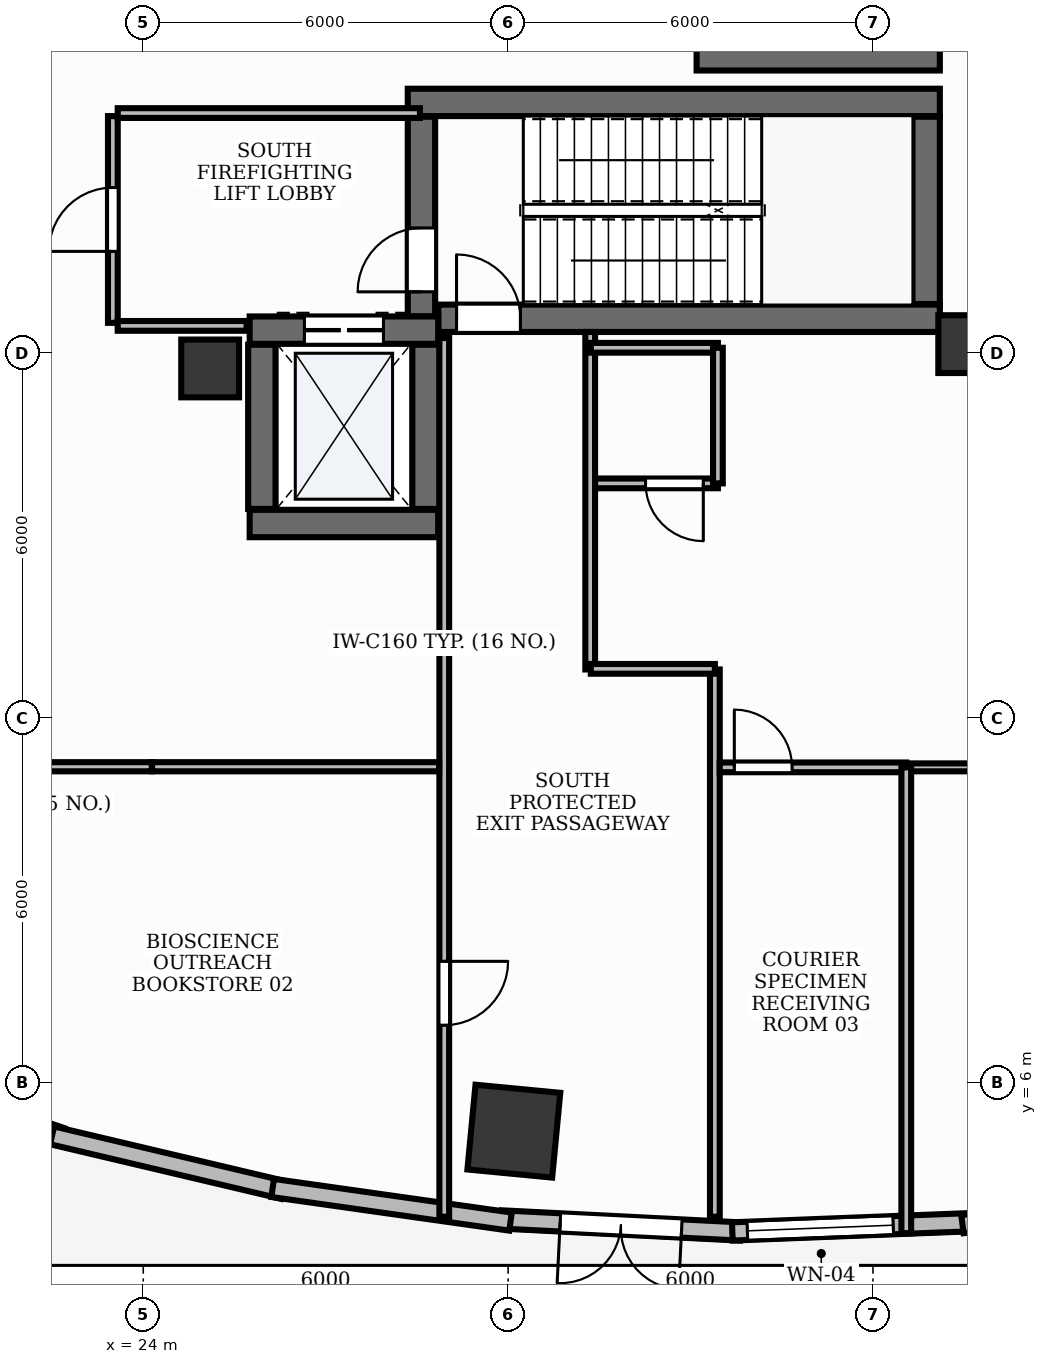
"""IFC4 building model, lengths in metres.
Left out: names, types, materials, properties, quantities, classifications, styles, units other than length and angle.
Written with IfcOpenShell. Run it as: python <this file> out.ifc"""

import sys

from ifc_helpers import new_model, si_unit, direction, frame, frame_2d, origin, origin_2d, place, context, subcontext, project, spatial, rectangle, extrude, element, fill, save


model = new_model("IFC4")
c1 = context("Model", 3, precision=1e-05, world=origin(), true_north=direction((0.0, 1.0)))
c2 = subcontext(c1, "Body", "Model", "MODEL_VIEW")
j1 = project(units=[si_unit("LENGTHUNIT", "METRE"), si_unit("PLANEANGLEUNIT", "RADIAN")], contexts=[c1])
p1 = place(None, origin())
s1 = spatial("IfcSite", under=j1, at=p1, CompositionType="ELEMENT")
p2 = place(p1, origin())
s2 = spatial("IfcBuilding", under=s1, at=p2, CompositionType="ELEMENT")
p3 = place(p2, origin())
s3 = spatial("IfcBuildingStorey", under=s2, at=p3, CompositionType="ELEMENT", Elevation=0.0)
p4 = place(p3, frame((28.852, 18.575, 0.0), z_axis=(0.0, 0.0, 1.0), x_axis=(1.0, 0.0, 0.0)))
e1 = element("IfcWall", 1, at=p4, inside=s3, PredefinedType="SHEAR", context=c2, shape_type="SweptSolid", body=[
    extrude(rectangle(XDim=8.248, YDim=0.45, at=frame_2d((4.124, 0.0))), origin(), (0.0, 0.0, 1.0), 5.1),
])
p5 = place(p4, frame((0.3, 0.0, 0.0)))
e2 = element("IfcOpeningElement", 2, at=p5, cuts=e1, PredefinedType="OPENING", context=c2, shape_type="SweptSolid", body=[
    extrude(rectangle(XDim=1.05, YDim=2.15, at=frame_2d((0.525, 1.075))), frame((0.0, 0.24, 0.0), z_axis=(0.0, -1.0, 0.0), x_axis=(1.0, 0.0, 0.0)), (0.0, 0.0, 1.0), 0.48),
])
p6 = place(p3, frame((28.35, 22.125, 0.0), z_axis=(0.0, 0.0, 1.0), x_axis=(1.0, 0.0, 0.0)))
e3 = element("IfcWall", 3, at=p6, inside=s3, PredefinedType="SHEAR", context=c2, shape_type="SweptSolid", body=[
    extrude(rectangle(XDim=8.75, YDim=0.45, at=frame_2d((4.375, 0.0))), origin(), (0.0, 0.0, 1.0), 5.1),
])
p7 = place(p3, frame((36.875, 18.81, 0.0), z_axis=(0.0, 0.0, 1.0), x_axis=(0.0, 1.0, 0.0)))
e4 = element("IfcWall", 4, at=p7, inside=s3, PredefinedType="SHEAR", context=c2, shape_type="SweptSolid", body=[
    extrude(rectangle(XDim=3.08, YDim=0.45, at=frame_2d((1.54, 0.0))), origin(), (0.0, 0.0, 1.0), 5.1),
])
p8 = place(p3, frame((28.575, 18.607, 0.0), z_axis=(0.0, 0.0, 1.0), x_axis=(0.0, 1.0, 0.0)))
e5 = element("IfcWall", 5, at=p8, inside=s3, PredefinedType="SHEAR", context=c2, shape_type="SweptSolid", body=[
    extrude(rectangle(XDim=3.283, YDim=0.45, at=frame_2d((1.642, 0.0))), origin(), (0.0, 0.0, 1.0), 5.1),
])
p9 = place(p8, frame((0.403, 0.0, 0.0)))
e6 = element("IfcOpeningElement", 6, at=p9, cuts=e5, PredefinedType="OPENING", context=c2, shape_type="SweptSolid", body=[
    extrude(rectangle(XDim=1.05, YDim=2.15, at=frame_2d((0.525, 1.075))), frame((0.0, 0.24, 0.0), z_axis=(0.0, -1.0, 0.0), x_axis=(1.0, 0.0, 0.0)), (0.0, 0.0, 1.0), 0.48),
])
p10 = place(p3, frame((33.1, 22.875, 0.0), z_axis=(0.0, 0.0, 1.0), x_axis=(1.0, 0.0, 0.0)))
e7 = element("IfcWall", 7, at=p10, inside=s3, PredefinedType="SHEAR", context=c2, shape_type="SweptSolid", body=[
    extrude(rectangle(XDim=4.0, YDim=0.45, at=frame_2d((2.0, 0.0))), origin(), (0.0, 0.0, 1.0), 5.1),
])
p11 = place(p3, frame((25.75, 15.2, 0.0), z_axis=(0.0, 0.0, 1.0), x_axis=(1.0, 0.0, 0.0)))
e8 = element("IfcWall", 8, at=p11, inside=s3, PredefinedType="SHEAR", context=c2, shape_type="SweptSolid", body=[
    extrude(rectangle(XDim=3.1, YDim=0.45, at=frame_2d((1.55, 0.0))), origin(), (0.0, 0.0, 1.0), 5.1),
])
p12 = place(p3, frame((25.75, 18.38, 0.0), z_axis=(0.0, 0.0, 1.0), x_axis=(1.0, 0.0, 0.0)))
e9 = element("IfcWall", 9, at=p12, inside=s3, PredefinedType="SHEAR", context=c2, shape_type="SweptSolid", body=[
    extrude(rectangle(XDim=3.1, YDim=0.45, at=frame_2d((1.55, 0.0))), origin(), (0.0, 0.0, 1.0), 5.1),
])
p13 = place(p12, frame((0.9, 0.0, 0.0)))
e10 = element("IfcOpeningElement", 10, at=p13, cuts=e9, PredefinedType="OPENING", context=c2, shape_type="SweptSolid", body=[
    extrude(rectangle(XDim=1.3, YDim=2.2, at=frame_2d((0.65, 1.1))), frame((0.0, 0.24, 0.0), z_axis=(0.0, -1.0, 0.0), x_axis=(1.0, 0.0, 0.0)), (0.0, 0.0, 1.0), 0.48),
])
for number, where, z_axis, x_axis in (
    (11, (25.95, 15.44, 0.0), (0.0, 0.0, 1.0), (0.0, 1.0, 0.0)),
    (12, (28.65, 15.44, 0.0), (0.0, 0.0, 1.0), (0.0, 1.0, 0.0)),
):
    element("IfcWall", number, at=place(p3, frame(where, z_axis=z_axis, x_axis=x_axis)), inside=s3, PredefinedType="SHEAR", context=c2, shape_type="SweptSolid", body=[
        extrude(rectangle(XDim=2.7, YDim=0.45, at=frame_2d((1.35, 0.0))), origin(), (0.0, 0.0, 1.0), 5.1),
    ])
for number, where, z_axis, x_axis in (
    (13, (25.1, 17.75, -0.0), (0.0, 0.0, 1.0), (1.0, 0.0, 0.0)),
    (14, (37.55, 18.15, -0.0), (0.0, 0.0, 1.0), (1.0, 0.0, 0.0)),
):
    element("IfcColumn", number, at=place(p3, frame(where, z_axis=z_axis, x_axis=x_axis)), inside=s3, PredefinedType="PILASTER", context=c2, shape_type="SweptSolid", body=[
        extrude(rectangle(XDim=0.95, YDim=0.95, at=origin_2d()), origin(), (0.0, 0.0, 1.0), 5.101),
    ])
p14 = place(p3, frame((30.094, 5.208, -0.0), z_axis=(0.0, 0.0, 1.0), x_axis=(-0.995462868748, 0.095150811579, 0.0)))
e15 = element("IfcColumn", 15, at=p14, inside=s3, PredefinedType="COLUMN", context=c2, shape_type="SweptSolid", body=[
    extrude(rectangle(XDim=1.4, YDim=1.4, at=origin_2d()), origin(), (0.0, 0.0, 1.0), 5.101),
])
p15 = place(p3, frame((19.065, 6.333, 0.0), z_axis=(0.0, 0.0, 1.0), x_axis=(0.947034337234, -0.321132315564, 0.0)))
e16 = element("IfcWall", 16, at=p15, inside=s3, PredefinedType="STANDARD", context=c2, shape_type="SweptSolid", body=[
    extrude(rectangle(XDim=3.79, YDim=0.3, at=frame_2d((1.895, 0.0))), origin(), (0.0, 0.0, 1.0), 5.1),
])
p16 = place(p15, frame((0.695, 0.0, 1.5)))
e17 = element("IfcOpeningElement", 17, at=p16, cuts=e16, PredefinedType="OPENING", context=c2, shape_type="SweptSolid", body=[
    extrude(rectangle(XDim=2.4, YDim=1.2, at=frame_2d((1.2, 0.6))), frame((0.0, 0.165, 0.0), z_axis=(0.0, -1.0, 0.0), x_axis=(1.0, 0.0, 0.0)), (0.0, 0.0, 1.0), 0.33),
])
p17 = place(p3, frame((33.821, 3.558, 0.0), z_axis=(0.0, 0.0, 1.0), x_axis=(-0.99873153138, 0.050352042933, 0.0)))
e18 = element("IfcWall", 18, at=p17, inside=s3, PredefinedType="STANDARD", context=c2, shape_type="SweptSolid", body=[
    extrude(rectangle(XDim=3.937, YDim=0.3, at=frame_2d((1.969, 0.0))), origin(), (0.0, 0.0, 1.0), 5.1),
])
p18 = place(p17, frame((0.969, 0.0, 0.0)))
e19 = element("IfcOpeningElement", 19, at=p18, cuts=e18, PredefinedType="OPENING", context=c2, shape_type="SweptSolid", body=[
    extrude(rectangle(XDim=2.0, YDim=2.3, at=frame_2d((1.0, 1.15))), frame((0.0, 0.165, 0.0), z_axis=(0.0, -1.0, 0.0), x_axis=(1.0, 0.0, 0.0)), (0.0, 0.0, 1.0), 0.33),
])
p19 = place(p3, frame((33.687, 3.558, 0.0), z_axis=(0.0, 0.0, 1.0), x_axis=(0.999247008469, 0.038799691558, 0.0)))
e20 = element("IfcWall", 20, at=p19, inside=s3, PredefinedType="STANDARD", context=c2, shape_type="SweptSolid", body=[
    extrude(rectangle(XDim=3.939, YDim=0.3, at=frame_2d((1.969, 0.0))), origin(), (0.0, 0.0, 1.0), 5.1),
])
p20 = place(p19, frame((0.248, 0.0, 1.5)))
e21 = element("IfcOpeningElement", 21, at=p20, cuts=e20, PredefinedType="OPENING", context=c2, shape_type="SweptSolid", body=[
    extrude(rectangle(XDim=2.4, YDim=1.2, at=frame_2d((1.2, 0.6))), frame((0.0, 0.165, 0.0), z_axis=(0.0, -1.0, 0.0), x_axis=(1.0, 0.0, 0.0)), (0.0, 0.0, 1.0), 0.33),
])
p21 = place(p3, frame((22.5, 5.138, 0.0), z_axis=(0.0, 0.0, 1.0), x_axis=(0.973197600754, -0.229970497863, 0.0)))
e22 = element("IfcWall", 22, at=p21, inside=s3, PredefinedType="STANDARD", context=c2, shape_type="SweptSolid", body=[
    extrude(rectangle(XDim=3.901, YDim=0.3, at=frame_2d((1.951, 0.0))), origin(), (0.0, 0.0, 1.0), 5.1),
])
p22 = place(p3, frame((26.128, 4.273, 0.0), z_axis=(0.0, 0.0, 1.0), x_axis=(0.990165832998, -0.139898617443, 0.0)))
e23 = element("IfcWall", 23, at=p22, inside=s3, PredefinedType="STANDARD", context=c2, shape_type="SweptSolid", body=[
    extrude(rectangle(XDim=3.951, YDim=0.3, at=frame_2d((1.976, 0.0))), origin(), (0.0, 0.0, 1.0), 5.1),
])
p23 = place(p3, frame((37.472, 3.678, 0.0), z_axis=(0.0, 0.0, 1.0), x_axis=(0.991734095036, 0.128310111617, 0.0)))
e24 = element("IfcWall", 24, at=p23, inside=s3, PredefinedType="STANDARD", context=c2, shape_type="SweptSolid", body=[
    extrude(rectangle(XDim=3.956, YDim=0.3, at=frame_2d((1.978, 0.0))), origin(), (0.0, 0.0, 1.0), 5.1),
])
p24 = place(p3, frame((23.5, 18.5, 0.0), z_axis=(0.0, 0.0, 1.0), x_axis=(0.0, 1.0, 0.0)))
e25 = element("IfcWall", 25, at=p24, inside=s3, PredefinedType="PARTITIONING", context=c2, shape_type="SweptSolid", body=[
    extrude(rectangle(XDim=3.4, YDim=0.16, at=frame_2d((1.7, 0.0))), origin(), (0.0, 0.0, 1.0), 4.11),
])
p25 = place(p24, frame((1.175, 0.0, 0.0)))
e26 = element("IfcOpeningElement", 26, at=p25, cuts=e25, PredefinedType="OPENING", context=c2, shape_type="SweptSolid", body=[
    extrude(rectangle(XDim=1.05, YDim=2.15, at=frame_2d((0.525, 1.075))), frame((0.0, 0.095, 0.0), z_axis=(0.0, -1.0, 0.0), x_axis=(1.0, 0.0, 0.0)), (0.0, 0.0, 1.0), 0.19),
])
p26 = place(p3, frame((23.58, 21.95, 0.0), z_axis=(0.0, 0.0, 1.0), x_axis=(1.0, 0.0, 0.0)))
e27 = element("IfcWall", 27, at=p26, inside=s3, PredefinedType="PARTITIONING", context=c2, shape_type="SweptSolid", body=[
    extrude(rectangle(XDim=4.97, YDim=0.16, at=frame_2d((2.485, 0.0))), origin(), (0.0, 0.0, 1.0), 4.11),
])
p27 = place(p3, frame((23.58, 18.45, 0.0), z_axis=(0.0, 0.0, 1.0), x_axis=(1.0, 0.0, 0.0)))
e28 = element("IfcWall", 28, at=p27, inside=s3, PredefinedType="PARTITIONING", context=c2, shape_type="SweptSolid", body=[
    extrude(rectangle(XDim=2.12, YDim=0.16, at=frame_2d((1.06, 0.0))), origin(), (0.0, 0.0, 1.0), 4.11),
])
p28 = place(p3, frame((28.95, 18.25, 0.0), z_axis=(0.0, 0.0, 1.0), x_axis=(0.0, -1.0, 0.0)))
e29 = element("IfcWall", 29, at=p28, inside=s3, PredefinedType="PARTITIONING", context=c2, shape_type="SweptSolid", body=[
    extrude(rectangle(XDim=14.45, YDim=0.16, at=frame_2d((7.225, 0.0))), origin(), (0.0, 0.0, 1.0), 4.11),
])
p29 = place(p28, frame((10.25, 0.0, 0.0)))
e30 = element("IfcOpeningElement", 30, at=p29, cuts=e29, PredefinedType="OPENING", context=c2, shape_type="SweptSolid", body=[
    extrude(rectangle(XDim=1.05, YDim=2.15, at=frame_2d((0.525, 1.075))), frame((0.0, 0.095, 0.0), z_axis=(0.0, -1.0, 0.0), x_axis=(1.0, 0.0, 0.0)), (0.0, 0.0, 1.0), 0.19),
])
p30 = place(p3, frame((31.35, 12.8, 0.0), z_axis=(0.0, 0.0, 1.0), x_axis=(0.0, 1.0, 0.0)))
e31 = element("IfcWall", 31, at=p30, inside=s3, PredefinedType="PARTITIONING", context=c2, shape_type="SweptSolid", body=[
    extrude(rectangle(XDim=5.55, YDim=0.16, at=frame_2d((2.775, 0.0))), origin(), (0.0, 0.0, 1.0), 4.11),
])
p31 = place(p3, frame((33.4, 3.8, 0.0), z_axis=(0.0, 0.0, 1.0), x_axis=(0.0, 1.0, 0.0)))
e32 = element("IfcWall", 32, at=p31, inside=s3, PredefinedType="PARTITIONING", context=c2, shape_type="SweptSolid", body=[
    extrude(rectangle(XDim=9.0, YDim=0.16, at=frame_2d((4.5, 0.0))), origin(), (0.0, 0.0, 1.0), 4.11),
])
p32 = place(p3, frame((33.45, 15.86, 0.0), z_axis=(0.0, 0.0, 1.0), x_axis=(-1.0, 0.0, 0.0)))
e33 = element("IfcWall", 33, at=p32, inside=s3, PredefinedType="PARTITIONING", context=c2, shape_type="SweptSolid", body=[
    extrude(rectangle(XDim=2.02, YDim=0.16, at=frame_2d((1.01, 0.0))), origin(), (0.0, 0.0, 1.0), 4.11),
])
p33 = place(p32, frame((0.24, 0.0, 0.0)))
e34 = element("IfcOpeningElement", 34, at=p33, cuts=e33, PredefinedType="OPENING", context=c2, shape_type="SweptSolid", body=[
    extrude(rectangle(XDim=0.95, YDim=2.15, at=frame_2d((0.475, 1.075))), frame((0.0, 0.095, 0.0), z_axis=(0.0, -1.0, 0.0), x_axis=(1.0, 0.0, 0.0)), (0.0, 0.0, 1.0), 0.19),
])
p34 = place(p3, frame((18.958, 11.2, 0.0), z_axis=(0.0, 0.0, 1.0), x_axis=(1.0, 0.0, 0.0)))
e35 = element("IfcWall", 35, at=p34, inside=s3, PredefinedType="PARTITIONING", context=c2, shape_type="SweptSolid", body=[
    extrude(rectangle(XDim=5.183, YDim=0.15, at=frame_2d((2.591, 0.0))), origin(), (0.0, 0.0, 1.0), 4.11),
])
p35 = place(p34, frame((2.43, 0.0, 0.0)))
e36 = element("IfcOpeningElement", 36, at=p35, cuts=e35, PredefinedType="OPENING", context=c2, shape_type="SweptSolid", body=[
    extrude(rectangle(XDim=0.95, YDim=2.15, at=frame_2d((0.475, 1.075))), frame((0.0, 0.09, 0.0), z_axis=(0.0, -1.0, 0.0), x_axis=(1.0, 0.0, 0.0)), (0.0, 0.0, 1.0), 0.18),
])
p36 = place(p3, frame((33.48, 11.19, 0.0), z_axis=(0.0, 0.0, 1.0), x_axis=(1.0, 0.0, 0.0)))
e37 = element("IfcWall", 37, at=p36, inside=s3, PredefinedType="PARTITIONING", context=c2, shape_type="SweptSolid", body=[
    extrude(rectangle(XDim=3.068, YDim=0.16, at=frame_2d((1.534, 0.0))), origin(), (0.0, 0.0, 1.0), 4.11),
])
p37 = place(p36, frame((0.24, 0.0, 0.0)))
e38 = element("IfcOpeningElement", 38, at=p37, cuts=e37, PredefinedType="OPENING", context=c2, shape_type="SweptSolid", body=[
    extrude(rectangle(XDim=0.95, YDim=2.15, at=frame_2d((0.475, 1.075))), frame((0.0, 0.095, 0.0), z_axis=(0.0, -1.0, 0.0), x_axis=(1.0, 0.0, 0.0)), (0.0, 0.0, 1.0), 0.19),
])
p38 = place(p3, frame((36.558, 11.19, 0.0), z_axis=(0.0, 0.0, 1.0), x_axis=(1.0, 0.0, 0.0)))
e39 = element("IfcWall", 39, at=p38, inside=s3, PredefinedType="PARTITIONING", context=c2, shape_type="SweptSolid", body=[
    extrude(rectangle(XDim=6.642, YDim=0.13, at=frame_2d((3.321, 0.0))), origin(), (0.0, 0.0, 1.0), 4.11),
])
p39 = place(p38, frame((5.192, 0.0, 0.0)))
e40 = element("IfcOpeningElement", 40, at=p39, cuts=e39, PredefinedType="OPENING", context=c2, shape_type="SweptSolid", body=[
    extrude(rectangle(XDim=0.9, YDim=2.15, at=frame_2d((0.45, 1.075))), frame((0.0, 0.08, 0.0), z_axis=(0.0, -1.0, 0.0), x_axis=(1.0, 0.0, 0.0)), (0.0, 0.0, 1.0), 0.16),
])
p40 = place(p3, frame((31.36, 18.09, 0.0), z_axis=(0.0, 0.0, 1.0), x_axis=(1.0, 0.0, 0.0)))
e41 = element("IfcWall", 41, at=p40, inside=s3, PredefinedType="PARTITIONING", context=c2, shape_type="SweptSolid", body=[
    extrude(rectangle(XDim=2.09, YDim=0.16, at=frame_2d((1.045, 0.0))), origin(), (0.0, 0.0, 1.0), 4.11),
])
p41 = place(p3, frame((33.45, 18.09, 0.0), z_axis=(0.0, 0.0, 1.0), x_axis=(0.0, -1.0, 0.0)))
e42 = element("IfcWall", 42, at=p41, inside=s3, PredefinedType="PARTITIONING", context=c2, shape_type="SweptSolid", body=[
    extrude(rectangle(XDim=2.23, YDim=0.16, at=frame_2d((1.115, 0.0))), origin(), (0.0, 0.0, 1.0), 4.11),
])
p42 = place(p3, frame((24.145, 11.2, 0.0), z_axis=(0.0, 0.0, 1.0), x_axis=(1.0, 0.0, 0.0)))
e43 = element("IfcWall", 43, at=p42, inside=s3, PredefinedType="PARTITIONING", context=c2, shape_type="SweptSolid", body=[
    extrude(rectangle(XDim=4.721, YDim=0.15, at=frame_2d((2.36, 0.0))), origin(), (0.0, 0.0, 1.0), 4.11),
])
p43 = place(p3, frame((33.4, 12.81, 0.0), z_axis=(0.0, 0.0, 1.0), x_axis=(-1.0, 0.0, 0.0)))
e44 = element("IfcWall", 44, at=p43, inside=s3, PredefinedType="PARTITIONING", context=c2, shape_type="SweptSolid", body=[
    extrude(rectangle(XDim=2.04, YDim=0.16, at=frame_2d((1.02, 0.0))), origin(), (0.0, 0.0, 1.0), 4.11),
])
p44 = place(p3, frame((36.548, 11.19, 0.0), z_axis=(0.0, 0.0, 1.0), x_axis=(0.0, -1.0, 0.0)))
e45 = element("IfcWall", 45, at=p44, inside=s3, PredefinedType="PARTITIONING", context=c2, shape_type="SweptSolid", body=[
    extrude(rectangle(XDim=7.66, YDim=0.16, at=frame_2d((3.83, 0.0))), origin(), (0.0, 0.0, 1.0), 4.11),
])
p45 = place(p18, origin())
e46 = element("IfcDoor", 46, at=p45, inside=s3, OperationType="DOUBLE_DOOR_SINGLE_SWING", PredefinedType="DOOR", context=c2, shape_type="SweptSolid", body=[
    extrude(rectangle(XDim=2.0, YDim=2.3, at=frame_2d((1.0, 1.15))), frame((0.0, 0.025, 0.0), z_axis=(0.0, -1.0, 0.0), x_axis=(1.0, 0.0, 0.0)), (0.0, 0.0, 1.0), 0.05),
])
fill(e19, e46)
p46 = place(p20, origin())
e47 = element("IfcWindow", 47, at=p46, inside=s3, PartitioningType="DOUBLE_PANEL_HORIZONTAL", PredefinedType="WINDOW", context=c2, shape_type="SweptSolid", body=[
    extrude(rectangle(XDim=2.4, YDim=1.2, at=frame_2d((1.2, 0.6))), frame((0.0, 0.03, 0.0), z_axis=(0.0, -1.0, 0.0), x_axis=(1.0, 0.0, 0.0)), (0.0, 0.0, 1.0), 0.06),
])
fill(e21, e47)
p47 = place(p9, origin())
e48 = element("IfcDoor", 48, at=p47, inside=s3, OperationType="SINGLE_SWING_LEFT", PredefinedType="DOOR", context=c2, shape_type="SweptSolid", body=[
    extrude(rectangle(XDim=1.05, YDim=2.15, at=frame_2d((0.525, 1.075))), frame((0.0, 0.025, 0.0), z_axis=(0.0, -1.0, 0.0), x_axis=(1.0, 0.0, 0.0)), (0.0, 0.0, 1.0), 0.05),
])
fill(e6, e48)
p48 = place(p5, origin())
e49 = element("IfcDoor", 49, at=p48, inside=s3, OperationType="SINGLE_SWING_LEFT", PredefinedType="DOOR", context=c2, shape_type="SweptSolid", body=[
    extrude(rectangle(XDim=1.05, YDim=2.15, at=frame_2d((0.525, 1.075))), frame((0.0, 0.025, 0.0), z_axis=(0.0, -1.0, 0.0), x_axis=(1.0, 0.0, 0.0)), (0.0, 0.0, 1.0), 0.05),
])
fill(e2, e49)
p49 = place(p13, origin())
e50 = element("IfcDoor", 50, at=p49, inside=s3, OperationType="DOUBLE_DOOR_SLIDING", PredefinedType="DOOR", context=c2, shape_type="SweptSolid", body=[
    extrude(rectangle(XDim=1.3, YDim=2.2, at=frame_2d((0.65, 1.1))), frame((0.0, 0.025, 0.0), z_axis=(0.0, -1.0, 0.0), x_axis=(1.0, 0.0, 0.0)), (0.0, 0.0, 1.0), 0.05),
])
fill(e10, e50)
p50 = place(p25, origin())
e51 = element("IfcDoor", 51, at=p50, inside=s3, OperationType="SINGLE_SWING_LEFT", PredefinedType="DOOR", context=c2, shape_type="SweptSolid", body=[
    extrude(rectangle(XDim=1.05, YDim=2.15, at=frame_2d((0.525, 1.075))), frame((0.0, 0.025, 0.0), z_axis=(0.0, -1.0, 0.0), x_axis=(1.0, 0.0, 0.0)), (0.0, 0.0, 1.0), 0.05),
])
fill(e26, e51)
p51 = place(p29, origin())
e52 = element("IfcDoor", 52, at=p51, inside=s3, OperationType="SINGLE_SWING_LEFT", PredefinedType="DOOR", context=c2, shape_type="SweptSolid", body=[
    extrude(rectangle(XDim=1.05, YDim=2.15, at=frame_2d((0.525, 1.075))), frame((0.0, 0.025, 0.0), z_axis=(0.0, -1.0, 0.0), x_axis=(1.0, 0.0, 0.0)), (0.0, 0.0, 1.0), 0.05),
])
fill(e30, e52)
p52 = place(p33, origin())
e53 = element("IfcDoor", 53, at=p52, inside=s3, OperationType="SINGLE_SWING_LEFT", PredefinedType="DOOR", context=c2, shape_type="SweptSolid", body=[
    extrude(rectangle(XDim=0.95, YDim=2.15, at=frame_2d((0.475, 1.075))), frame((0.0, 0.025, 0.0), z_axis=(0.0, -1.0, 0.0), x_axis=(1.0, 0.0, 0.0)), (0.0, 0.0, 1.0), 0.05),
])
fill(e34, e53)
p53 = place(p37, origin())
e54 = element("IfcDoor", 54, at=p53, inside=s3, OperationType="SINGLE_SWING_LEFT", PredefinedType="DOOR", context=c2, shape_type="SweptSolid", body=[
    extrude(rectangle(XDim=0.95, YDim=2.15, at=frame_2d((0.475, 1.075))), frame((0.0, 0.025, 0.0), z_axis=(0.0, -1.0, 0.0), x_axis=(1.0, 0.0, 0.0)), (0.0, 0.0, 1.0), 0.05),
])
fill(e38, e54)
save(model, sys.argv[1])
